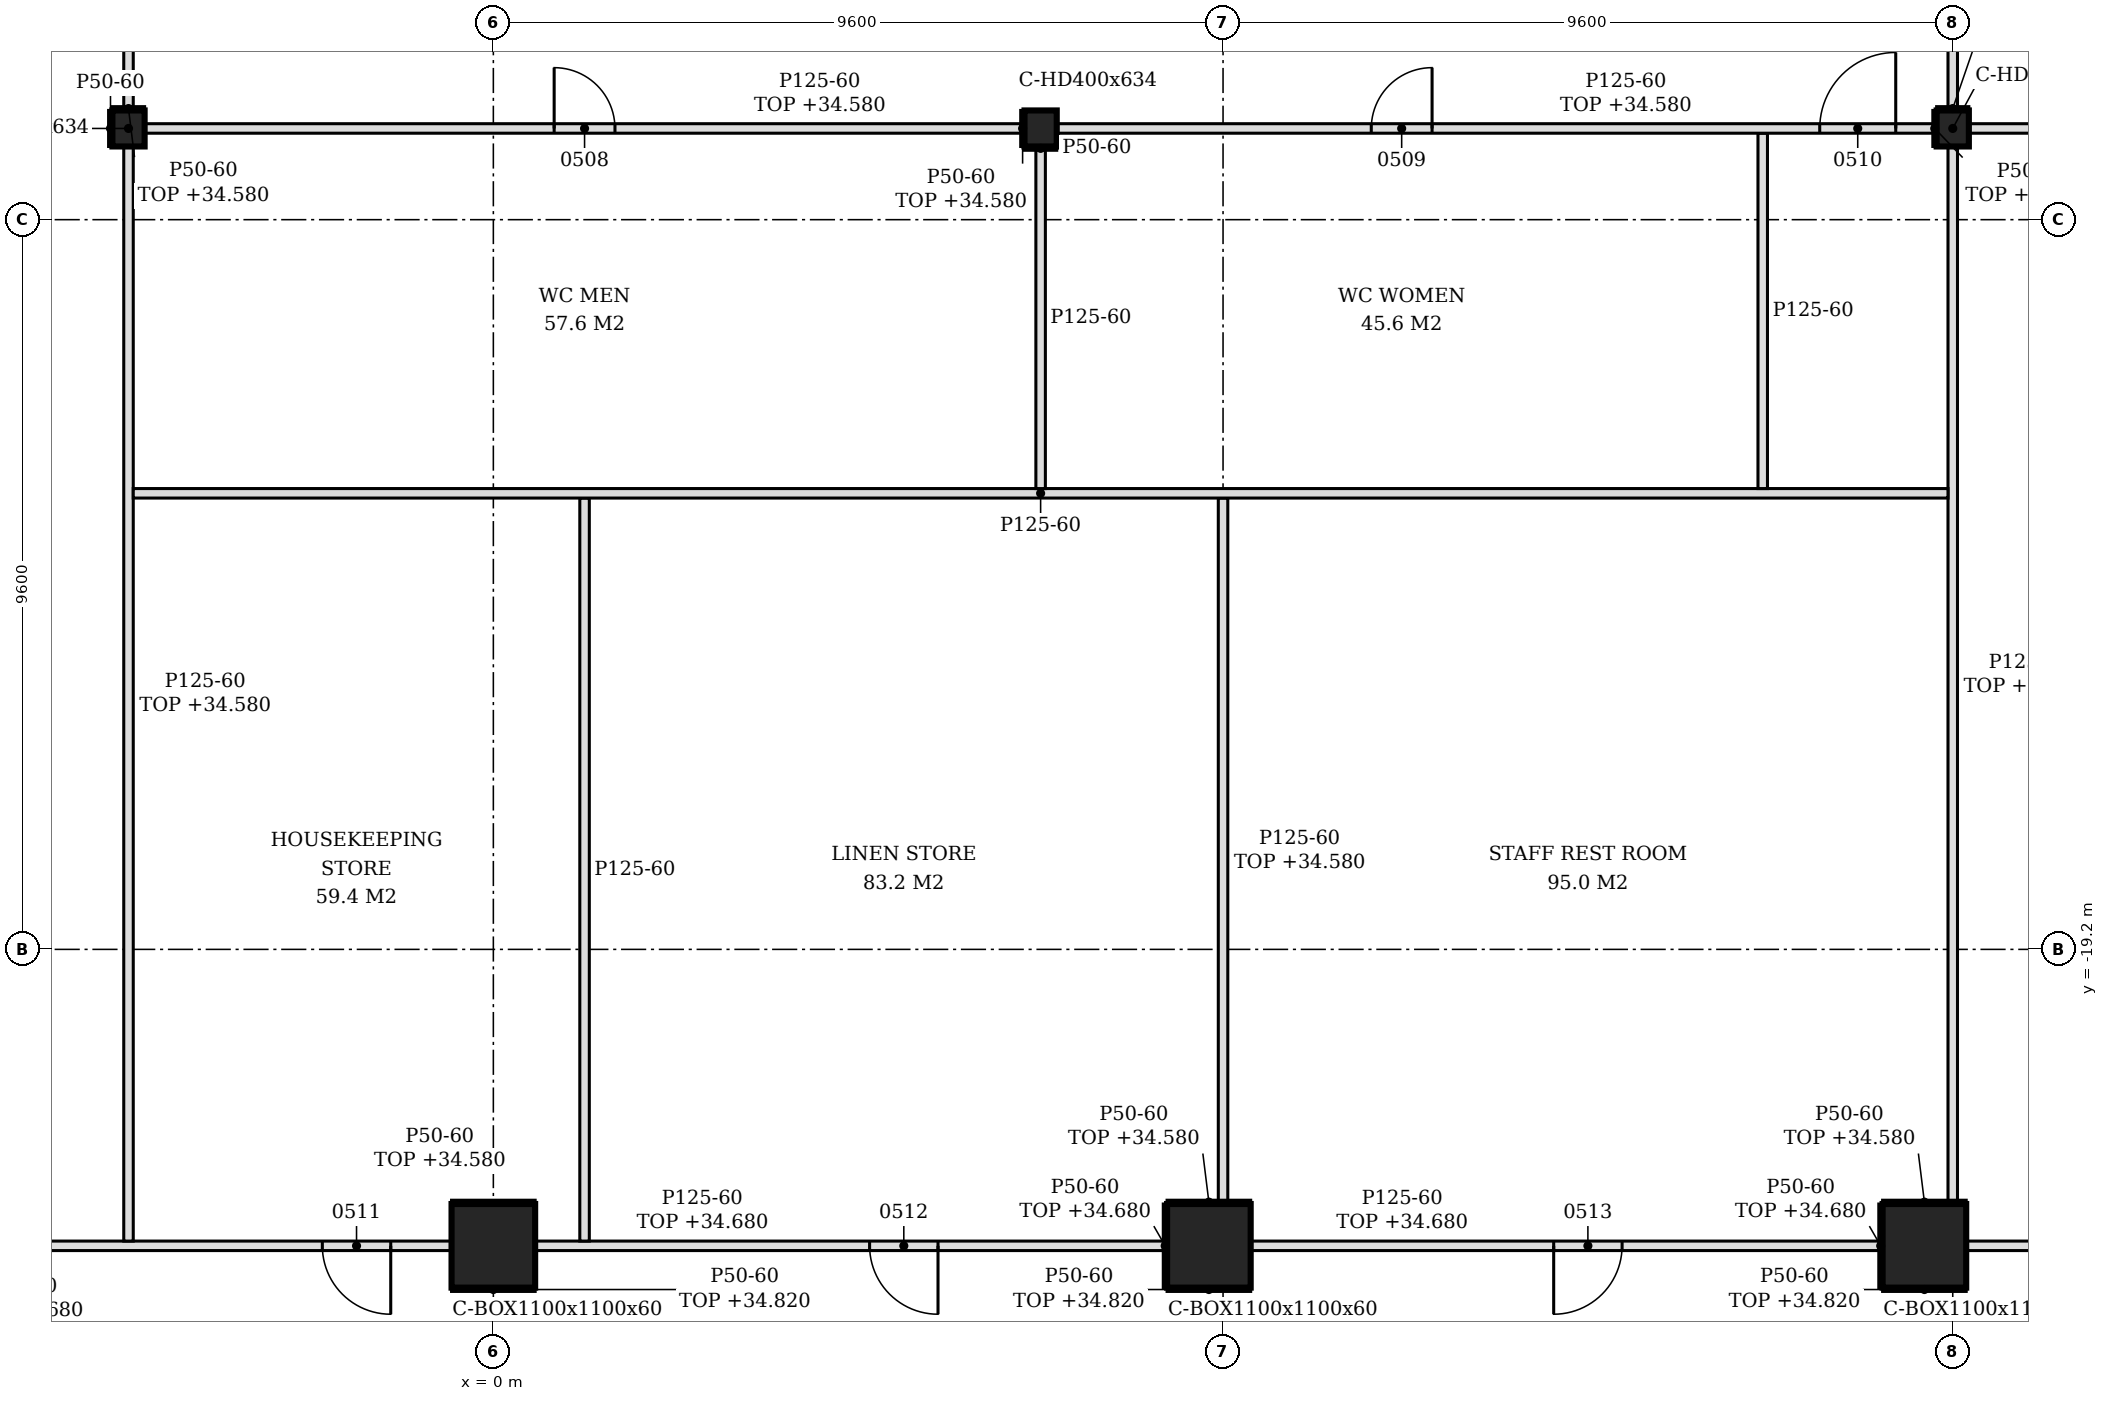
"""IFC4 building model, lengths in metres.
Left out: names, types, materials, properties, quantities, classifications, styles, units other than length and angle.
Written with IfcOpenShell. Run it as: python <this file> out.ifc"""

import sys

from ifc_helpers import new_model, si_unit, direction, frame, frame_2d, origin, origin_2d, place, context, subcontext, project, spatial, polyline, rectangle, hollow_rectangle, i_section, outline, extrude, element, fill, save


model = new_model("IFC4")
c1 = context("Model", 3, precision=1e-05, world=origin(), true_north=direction((0.0, 1.0)))
c2 = subcontext(c1, "Body", "Model", "MODEL_VIEW")
j1 = project(units=[si_unit("LENGTHUNIT", "METRE"), si_unit("PLANEANGLEUNIT", "RADIAN")], contexts=[c1])
p1 = place(None, origin())
s1 = spatial("IfcSite", under=j1, at=p1, CompositionType="ELEMENT")
p2 = place(p1, origin())
s2 = spatial("IfcBuilding", under=s1, at=p2, CompositionType="ELEMENT")
p3 = place(p2, frame((0.0, 0.0, 30.6)))
s3 = spatial("IfcBuildingStorey", under=s2, at=p3, CompositionType="ELEMENT", Elevation=30.6)
for number, where, z_axis, x_axis in (
    (1, (0.0, -23.1, -0.2), (0.0, 0.0, 1.0), (1.0, 0.0, 0.0)),
    (2, (9.414, -23.1, -0.2), (0.0, 0.0, 1.0), (1.0, 0.0, 0.0)),
    (3, (18.827, -23.1, -0.2), (0.0, 0.0, 1.0), (1.0, 0.0, 0.0)),
):
    element("IfcColumn", number, at=place(p3, frame(where, z_axis=z_axis, x_axis=x_axis)), inside=s3, PredefinedType="COLUMN", context=c2, shape_type="SweptSolid", body=[
        extrude(hollow_rectangle(XDim=1.1, YDim=1.1, WallThickness=0.06, at=origin_2d()), origin(), (0.0, 0.0, 1.0), 4.8),
    ])
for number, where, z_axis, x_axis in (
    (4, (-4.8, -8.4, -0.2), (0.0, 0.0, 1.0), (1.0, 0.0, 0.0)),
    (5, (7.2, -8.4, -0.2), (0.0, 0.0, 1.0), (1.0, 0.0, 0.0)),
    (6, (19.2, -8.4, -0.2), (0.0, 0.0, 1.0), (1.0, 0.0, 0.0)),
):
    element("IfcColumn", number, at=place(p3, frame(where, z_axis=z_axis, x_axis=x_axis)), inside=s3, PredefinedType="COLUMN", context=c2, shape_type="SweptSolid", body=[
        extrude(i_section(OverallWidth=0.424, OverallDepth=0.474, WebThickness=0.048, FlangeThickness=0.077, FilletRadius=0.015, at=origin_2d()), origin(), (0.0, 0.0, 1.0), 4.8),
    ])
p4 = place(p3, frame((-8.864, -23.1, 0.0), z_axis=(0.0, 0.0, 1.0), x_axis=(1.0, 0.0, 0.0)))
e7 = element("IfcWall", 7, at=p4, inside=s3, PredefinedType="PARTITIONING", context=c2, shape_type="SweptSolid", body=[
    extrude(rectangle(XDim=8.313, YDim=0.125, at=frame_2d((4.157, 0.0))), origin(), (0.0, 0.0, 1.0), 4.08),
])
p5 = place(p4, frame((6.614, 0.0, 0.0)))
e8 = element("IfcOpeningElement", 8, at=p5, cuts=e7, PredefinedType="OPENING", context=c2, shape_type="SweptSolid", body=[
    extrude(rectangle(XDim=0.9, YDim=2.1, at=frame_2d((0.45, 1.05))), frame((0.0, 0.073, 0.0), z_axis=(0.0, -1.0, 0.0), x_axis=(1.0, 0.0, 0.0)), (0.0, 0.0, 1.0), 0.145),
])
p6 = place(p3, frame((0.55, -23.1, 0.0), z_axis=(0.0, 0.0, 1.0), x_axis=(1.0, 0.0, 0.0)))
e9 = element("IfcWall", 9, at=p6, inside=s3, PredefinedType="PARTITIONING", context=c2, shape_type="SweptSolid", body=[
    extrude(rectangle(XDim=8.313, YDim=0.125, at=frame_2d((4.157, 0.0))), origin(), (0.0, 0.0, 1.0), 4.08),
])
p7 = place(p6, frame((4.4, 0.0, 0.0)))
e10 = element("IfcOpeningElement", 10, at=p7, cuts=e9, PredefinedType="OPENING", context=c2, shape_type="SweptSolid", body=[
    extrude(rectangle(XDim=0.9, YDim=2.1, at=frame_2d((0.45, 1.05))), frame((0.0, 0.073, 0.0), z_axis=(0.0, -1.0, 0.0), x_axis=(1.0, 0.0, 0.0)), (0.0, 0.0, 1.0), 0.145),
])
p8 = place(p3, frame((9.964, -23.1, 0.0), z_axis=(0.0, 0.0, 1.0), x_axis=(1.0, 0.0, 0.0)))
e11 = element("IfcWall", 11, at=p8, inside=s3, PredefinedType="PARTITIONING", context=c2, shape_type="SweptSolid", body=[
    extrude(rectangle(XDim=8.313, YDim=0.125, at=frame_2d((4.157, 0.0))), origin(), (0.0, 0.0, 1.0), 4.08),
])
p9 = place(p8, frame((3.986, 0.0, 0.0)))
e12 = element("IfcOpeningElement", 12, at=p9, cuts=e11, PredefinedType="OPENING", context=c2, shape_type="SweptSolid", body=[
    extrude(rectangle(XDim=0.9, YDim=2.1, at=frame_2d((0.45, 1.05))), frame((0.0, 0.073, 0.0), z_axis=(0.0, -1.0, 0.0), x_axis=(1.0, 0.0, 0.0)), (0.0, 0.0, 1.0), 0.145),
])
p10 = place(p3, frame((19.377, -23.1, 0.0), z_axis=(0.0, 0.0, 1.0), x_axis=(1.0, 0.0, 0.0)))
e13 = element("IfcWall", 13, at=p10, inside=s3, PredefinedType="PARTITIONING", context=c2, shape_type="SweptSolid", body=[
    extrude(rectangle(XDim=8.585, YDim=0.125, at=frame_2d((4.292, 0.0))), origin(), (0.0, 0.0, 1.0), 4.6),
])
p11 = place(p3, frame((-4.8, -23.038, 0.0), z_axis=(0.0, 0.0, 1.0), x_axis=(0.0, 1.0, 0.0)))
e14 = element("IfcWall", 14, at=p11, inside=s3, PredefinedType="PARTITIONING", context=c2, shape_type="SweptSolid", body=[
    extrude(rectangle(XDim=14.401, YDim=0.125, at=frame_2d((7.2, 0.0))), origin(), (0.0, 0.0, 1.0), 3.98),
])
p12 = place(p3, frame((1.2, -23.038, 0.0), z_axis=(0.0, 0.0, 1.0), x_axis=(0.0, 1.0, 0.0)))
e15 = element("IfcWall", 15, at=p12, inside=s3, PredefinedType="PARTITIONING", context=c2, shape_type="SweptSolid", body=[
    extrude(outline(polyline([(0.0, 0.0), (9.775, 0.0), (9.775, 4.6), (0.087, 4.6), (0.085, 4.08), (0.0, 4.08), (0.0, 0.0)])), frame((0.0, 0.062, 0.0), z_axis=(0.0, -1.0, 0.0), x_axis=(1.0, 0.0, 0.0)), (0.0, 0.0, 1.0), 0.125),
])
p13 = place(p3, frame((9.6, -22.55, 0.0), z_axis=(0.0, 0.0, 1.0), x_axis=(0.0, 1.0, 0.0)))
e16 = element("IfcWall", 16, at=p13, inside=s3, PredefinedType="PARTITIONING", context=c2, shape_type="SweptSolid", body=[
    extrude(rectangle(XDim=9.288, YDim=0.125, at=frame_2d((4.644, 0.0))), origin(), (0.0, 0.0, 1.0), 3.98),
])
p14 = place(p3, frame((19.2, -22.55, 0.0), z_axis=(0.0, 0.0, 1.0), x_axis=(0.0, 1.0, 0.0)))
e17 = element("IfcWall", 17, at=p14, inside=s3, PredefinedType="PARTITIONING", context=c2, shape_type="SweptSolid", body=[
    extrude(rectangle(XDim=13.913, YDim=0.125, at=frame_2d((6.957, 0.0))), origin(), (0.0, 0.0, 1.0), 3.98),
])
p15 = place(p3, frame((-4.738, -13.2, 0.0), z_axis=(0.0, 0.0, 1.0), x_axis=(1.0, 0.0, 0.0)))
e18 = element("IfcWall", 18, at=p15, inside=s3, PredefinedType="PARTITIONING", context=c2, shape_type="SweptSolid", body=[
    extrude(outline(polyline([(0.0, 0.0), (23.875, 0.0), (23.875, 3.98), (23.788, 3.98), (23.785, 4.6), (19.288, 4.6), (19.285, 3.98), (18.988, 3.98), (18.986, 4.6), (14.488, 4.6), (14.486, 3.98), (14.188, 3.98), (14.186, 4.6), (9.688, 4.6), (9.686, 3.98), (9.387, 3.98), (9.385, 4.6), (4.887, 4.6), (4.885, 3.98), (4.587, 3.98), (4.585, 4.6), (0.087, 4.6), (0.085, 3.98), (0.0, 3.98), (0.0, 0.0)])), frame((0.0, 0.062, 0.0), z_axis=(0.0, -1.0, 0.0), x_axis=(1.0, 0.0, 0.0)), (0.0, 0.0, 1.0), 0.125),
])
p16 = place(p3, frame((7.2, -13.137, 0.0), z_axis=(0.0, 0.0, 1.0), x_axis=(0.0, 1.0, 0.0)))
e19 = element("IfcWall", 19, at=p16, inside=s3, PredefinedType="PARTITIONING", context=c2, shape_type="SweptSolid", body=[
    extrude(rectangle(XDim=4.5, YDim=0.125, at=frame_2d((2.25, 0.0))), origin(), (0.0, 0.0, 1.0), 4.6),
])
p17 = place(p3, frame((16.7, -13.137, 0.0), z_axis=(0.0, 0.0, 1.0), x_axis=(0.0, 1.0, 0.0)))
e20 = element("IfcWall", 20, at=p17, inside=s3, PredefinedType="PARTITIONING", context=c2, shape_type="SweptSolid", body=[
    extrude(outline(polyline([(0.0, 0.0), (4.675, 0.0), (4.675, 3.98), (4.587, 3.98), (4.585, 4.6), (0.0, 4.6), (0.0, 0.0)])), frame((0.0, 0.062, 0.0), z_axis=(0.0, -1.0, 0.0), x_axis=(1.0, 0.0, 0.0)), (0.0, 0.0, 1.0), 0.125),
])
p18 = place(p3, frame((-4.588, -8.4, 0.0), z_axis=(0.0, 0.0, 1.0), x_axis=(1.0, 0.0, 0.0)))
e21 = element("IfcWall", 21, at=p18, inside=s3, PredefinedType="PARTITIONING", context=c2, shape_type="SweptSolid", body=[
    extrude(rectangle(XDim=11.576, YDim=0.125, at=frame_2d((5.788, 0.0))), origin(), (0.0, 0.0, 1.0), 3.98),
])
p19 = place(p18, frame((5.388, 0.0, 0.0)))
e22 = element("IfcOpeningElement", 22, at=p19, cuts=e21, PredefinedType="OPENING", context=c2, shape_type="SweptSolid", body=[
    extrude(rectangle(XDim=0.8, YDim=2.1, at=frame_2d((0.4, 1.05))), frame((0.0, 0.073, 0.0), z_axis=(0.0, -1.0, 0.0), x_axis=(1.0, 0.0, 0.0)), (0.0, 0.0, 1.0), 0.145),
])
p20 = place(p3, frame((7.412, -8.4, 0.0), z_axis=(0.0, 0.0, 1.0), x_axis=(1.0, 0.0, 0.0)))
e23 = element("IfcWall", 23, at=p20, inside=s3, PredefinedType="PARTITIONING", context=c2, shape_type="SweptSolid", body=[
    extrude(rectangle(XDim=11.576, YDim=0.125, at=frame_2d((5.788, 0.0))), origin(), (0.0, 0.0, 1.0), 3.98),
])
p21 = place(p20, frame((4.138, 0.0, 0.0)))
e24 = element("IfcOpeningElement", 24, at=p21, cuts=e23, PredefinedType="OPENING", context=c2, shape_type="SweptSolid", body=[
    extrude(rectangle(XDim=0.8, YDim=2.1, at=frame_2d((0.4, 1.05))), frame((0.0, 0.073, 0.0), z_axis=(0.0, -1.0, 0.0), x_axis=(1.0, 0.0, 0.0)), (0.0, 0.0, 1.0), 0.145),
])
p22 = place(p20, frame((10.038, 0.0, 0.0)))
e25 = element("IfcOpeningElement", 25, at=p22, cuts=e23, PredefinedType="OPENING", context=c2, shape_type="SweptSolid", body=[
    extrude(rectangle(XDim=1.0, YDim=2.1, at=frame_2d((0.5, 1.05))), frame((0.0, 0.073, 0.0), z_axis=(0.0, -1.0, 0.0), x_axis=(1.0, 0.0, 0.0)), (0.0, 0.0, 1.0), 0.145),
])
p23 = place(p3, frame((19.412, -8.4, 0.0), z_axis=(0.0, 0.0, 1.0), x_axis=(1.0, 0.0, 0.0)))
e26 = element("IfcWall", 26, at=p23, inside=s3, PredefinedType="PARTITIONING", context=c2, shape_type="SweptSolid", body=[
    extrude(outline(polyline([(0.0, 0.0), (8.425, 0.0), (8.426, 4.08), (8.338, 4.08), (8.336, 4.6), (0.0, 4.6), (0.0, 0.0)])), frame((0.0, 0.062, 0.0), z_axis=(0.0, -1.0, 0.0), x_axis=(1.0, 0.0, 0.0)), (0.0, 0.0, 1.0), 0.125),
])
for number, where, z_axis, x_axis in (
    (27, (-4.8, -8.163, 0.0), (0.0, 0.0, 1.0), (0.0, 1.0, 0.0)),
    (28, (19.2, -8.163, 0.0), (0.0, 0.0, 1.0), (0.0, 1.0, 0.0)),
):
    element("IfcWall", number, at=place(p3, frame(where, z_axis=z_axis, x_axis=x_axis)), inside=s3, PredefinedType="PARTITIONING", context=c2, shape_type="SweptSolid", body=[
        extrude(rectangle(XDim=10.326, YDim=0.125, at=frame_2d((5.163, 0.0))), origin(), (0.0, 0.0, 1.0), 3.98),
    ])
p24 = place(p3, frame((-0.55, -22.525, 0.0), z_axis=(0.0, 0.0, 1.0), x_axis=(1.0, 0.0, 0.0)))
e29 = element("IfcWall", 29, at=p24, inside=s3, PredefinedType="PARTITIONING", context=c2, shape_type="SweptSolid", body=[
    extrude(rectangle(XDim=1.1, YDim=0.05, at=frame_2d((0.55, 0.0))), origin(), (0.0, 0.0, 1.0), 3.98),
])
p25 = place(p3, frame((-0.55, -23.675, 0.0), z_axis=(0.0, 0.0, 1.0), x_axis=(1.0, 0.0, 0.0)))
e30 = element("IfcWall", 30, at=p25, inside=s3, PredefinedType="PARTITIONING", context=c2, shape_type="SweptSolid", body=[
    extrude(rectangle(XDim=1.1, YDim=0.05, at=frame_2d((0.55, 0.0))), origin(), (0.0, 0.0, 1.0), 4.22),
])
p26 = place(p3, frame((8.864, -22.525, 0.0), z_axis=(0.0, 0.0, 1.0), x_axis=(1.0, 0.0, 0.0)))
e31 = element("IfcWall", 31, at=p26, inside=s3, PredefinedType="PARTITIONING", context=c2, shape_type="SweptSolid", body=[
    extrude(rectangle(XDim=1.1, YDim=0.05, at=frame_2d((0.55, 0.0))), origin(), (0.0, 0.0, 1.0), 3.98),
])
p27 = place(p3, frame((8.864, -23.675, 0.0), z_axis=(0.0, 0.0, 1.0), x_axis=(1.0, 0.0, 0.0)))
e32 = element("IfcWall", 32, at=p27, inside=s3, PredefinedType="PARTITIONING", context=c2, shape_type="SweptSolid", body=[
    extrude(rectangle(XDim=1.1, YDim=0.05, at=frame_2d((0.55, 0.0))), origin(), (0.0, 0.0, 1.0), 4.22),
])
p28 = place(p3, frame((18.277, -22.525, 0.0), z_axis=(0.0, 0.0, 1.0), x_axis=(1.0, 0.0, 0.0)))
e33 = element("IfcWall", 33, at=p28, inside=s3, PredefinedType="PARTITIONING", context=c2, shape_type="SweptSolid", body=[
    extrude(rectangle(XDim=1.1, YDim=0.05, at=frame_2d((0.55, 0.0))), origin(), (0.0, 0.0, 1.0), 3.98),
])
p29 = place(p3, frame((18.277, -23.675, 0.0), z_axis=(0.0, 0.0, 1.0), x_axis=(1.0, 0.0, 0.0)))
e34 = element("IfcWall", 34, at=p29, inside=s3, PredefinedType="PARTITIONING", context=c2, shape_type="SweptSolid", body=[
    extrude(rectangle(XDim=1.1, YDim=0.05, at=frame_2d((0.55, 0.0))), origin(), (0.0, 0.0, 1.0), 4.22),
])
p30 = place(p3, frame((-5.037, -8.637, 0.0), z_axis=(0.0, 0.0, 1.0), x_axis=(0.0, 1.0, 0.0)))
e35 = element("IfcWall", 35, at=p30, inside=s3, PredefinedType="PARTITIONING", context=c2, shape_type="SweptSolid", body=[
    extrude(rectangle(XDim=0.474, YDim=0.05, at=frame_2d((0.237, 0.0))), origin(), (0.0, 0.0, 1.0), 4.6),
])
for number, where, z_axis, x_axis in (
    (36, (8.839, -23.65, 0.0), (0.0, 0.0, 1.0), (0.0, 1.0, 0.0)),
    (37, (18.252, -23.65, 0.0), (0.0, 0.0, 1.0), (0.0, 1.0, 0.0)),
):
    element("IfcWall", number, at=place(p3, frame(where, z_axis=z_axis, x_axis=x_axis)), inside=s3, PredefinedType="PARTITIONING", context=c2, shape_type="SweptSolid", body=[
        extrude(rectangle(XDim=1.1, YDim=0.05, at=frame_2d((0.55, 0.0))), origin(), (0.0, 0.0, 1.0), 4.08),
    ])
for number, where, z_axis, x_axis in (
    (38, (18.963, -8.637, 0.0), (0.0, 0.0, 1.0), (0.0, 1.0, 0.0)),
    (39, (6.963, -8.637, 0.0), (0.0, 0.0, 1.0), (0.0, 1.0, 0.0)),
):
    element("IfcWall", number, at=place(p3, frame(where, z_axis=z_axis, x_axis=x_axis)), inside=s3, PredefinedType="PARTITIONING", context=c2, shape_type="SweptSolid", body=[
        extrude(rectangle(XDim=0.474, YDim=0.05, at=frame_2d((0.237, 0.0))), origin(), (0.0, 0.0, 1.0), 3.98),
    ])
p31 = place(p3, frame((-5.012, -8.138, 0.0), z_axis=(0.0, 0.0, 1.0), x_axis=(1.0, 0.0, 0.0)))
e40 = element("IfcWall", 40, at=p31, inside=s3, PredefinedType="PARTITIONING", context=c2, shape_type="SweptSolid", body=[
    extrude(rectangle(XDim=0.424, YDim=0.05, at=frame_2d((0.212, 0.0))), origin(), (0.0, 0.0, 1.0), 3.98),
])
p32 = place(p3, frame((6.988, -8.662, 0.0), z_axis=(0.0, 0.0, 1.0), x_axis=(1.0, 0.0, 0.0)))
e41 = element("IfcWall", 41, at=p32, inside=s3, PredefinedType="PARTITIONING", context=c2, shape_type="SweptSolid", body=[
    extrude(rectangle(XDim=0.424, YDim=0.05, at=frame_2d((0.212, 0.0))), origin(), (0.0, 0.0, 1.0), 4.6),
])
p33 = place(p3, frame((18.988, -8.138, 0.0), z_axis=(0.0, 0.0, 1.0), x_axis=(1.0, 0.0, 0.0)))
e42 = element("IfcWall", 42, at=p33, inside=s3, PredefinedType="PARTITIONING", context=c2, shape_type="SweptSolid", body=[
    extrude(rectangle(XDim=0.424, YDim=0.05, at=frame_2d((0.212, 0.0))), origin(), (0.0, 0.0, 1.0), 3.98),
])
p34 = place(p19, origin())
e43 = element("IfcDoor", 43, at=p34, inside=s3, OperationType="SINGLE_SWING_LEFT", PredefinedType="DOOR", context=c2, shape_type="SweptSolid", body=[
    extrude(rectangle(XDim=0.8, YDim=2.1, at=frame_2d((0.4, 1.05))), frame((0.0, 0.025, 0.0), z_axis=(0.0, -1.0, 0.0), x_axis=(1.0, 0.0, 0.0)), (0.0, 0.0, 1.0), 0.05),
])
fill(e22, e43)
p35 = place(p21, origin())
e44 = element("IfcDoor", 44, at=p35, inside=s3, OperationType="SINGLE_SWING_RIGHT", PredefinedType="DOOR", context=c2, shape_type="SweptSolid", body=[
    extrude(rectangle(XDim=0.8, YDim=2.1, at=frame_2d((0.4, 1.05))), frame((0.0, 0.025, 0.0), z_axis=(0.0, -1.0, 0.0), x_axis=(1.0, 0.0, 0.0)), (0.0, 0.0, 1.0), 0.05),
])
fill(e24, e44)
p36 = place(p22, origin())
e45 = element("IfcDoor", 45, at=p36, inside=s3, OperationType="SINGLE_SWING_RIGHT", PredefinedType="DOOR", context=c2, shape_type="SweptSolid", body=[
    extrude(rectangle(XDim=1.0, YDim=2.1, at=frame_2d((0.5, 1.05))), frame((0.0, 0.025, 0.0), z_axis=(0.0, -1.0, 0.0), x_axis=(1.0, 0.0, 0.0)), (0.0, 0.0, 1.0), 0.05),
])
fill(e25, e45)
p37 = place(p5, frame((0.9, 0.0, 0.0), z_axis=(0.0, 0.0, 1.0), x_axis=(-1.0, 0.0, 0.0)))
e46 = element("IfcDoor", 46, at=p37, inside=s3, OperationType="SINGLE_SWING_LEFT", PredefinedType="DOOR", context=c2, shape_type="SweptSolid", body=[
    extrude(rectangle(XDim=0.9, YDim=2.1, at=frame_2d((0.45, 1.05))), frame((0.0, 0.025, 0.0), z_axis=(0.0, -1.0, 0.0), x_axis=(1.0, 0.0, 0.0)), (0.0, 0.0, 1.0), 0.05),
])
fill(e8, e46)
p38 = place(p7, frame((0.9, 0.0, 0.0), z_axis=(0.0, 0.0, 1.0), x_axis=(-1.0, 0.0, 0.0)))
e47 = element("IfcDoor", 47, at=p38, inside=s3, OperationType="SINGLE_SWING_LEFT", PredefinedType="DOOR", context=c2, shape_type="SweptSolid", body=[
    extrude(rectangle(XDim=0.9, YDim=2.1, at=frame_2d((0.45, 1.05))), frame((0.0, 0.025, 0.0), z_axis=(0.0, -1.0, 0.0), x_axis=(1.0, 0.0, 0.0)), (0.0, 0.0, 1.0), 0.05),
])
fill(e10, e47)
p39 = place(p9, frame((0.9, 0.0, 0.0), z_axis=(0.0, 0.0, 1.0), x_axis=(-1.0, 0.0, 0.0)))
e48 = element("IfcDoor", 48, at=p39, inside=s3, OperationType="SINGLE_SWING_RIGHT", PredefinedType="DOOR", context=c2, shape_type="SweptSolid", body=[
    extrude(rectangle(XDim=0.9, YDim=2.1, at=frame_2d((0.45, 1.05))), frame((0.0, 0.025, 0.0), z_axis=(0.0, -1.0, 0.0), x_axis=(1.0, 0.0, 0.0)), (0.0, 0.0, 1.0), 0.05),
])
fill(e12, e48)
save(model, sys.argv[1])
